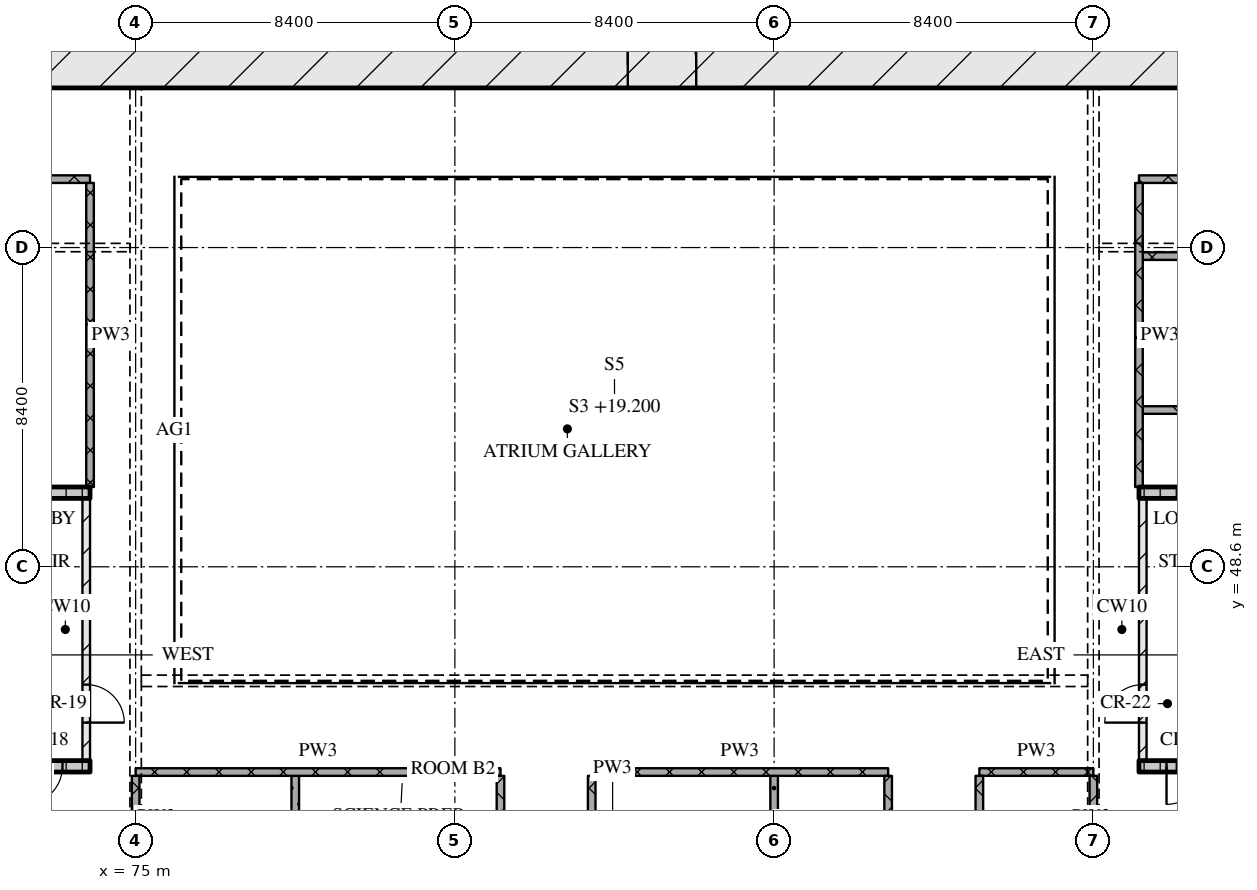
"""IFC4 building model, lengths in metres.
Left out: names, types, materials, properties, quantities, classifications, styles, units other than length and angle.
Written with IfcOpenShell. Run it as: python <this file> out.ifc"""

import sys

from ifc_helpers import new_model, si_unit, direction, frame, frame_2d, origin, place, context, subcontext, project, spatial, rectangle, extrude, element, fill, save


model = new_model("IFC4")
c1 = context("Model", 3, precision=1e-05, world=origin(), true_north=direction((0.0, 1.0)))
c2 = subcontext(c1, "Body", "Model", "MODEL_VIEW")
j1 = project(units=[si_unit("LENGTHUNIT", "METRE"), si_unit("PLANEANGLEUNIT", "RADIAN")], contexts=[c1])
p1 = place(None, origin())
s1 = spatial("IfcSite", under=j1, at=p1, CompositionType="ELEMENT")
p2 = place(p1, origin())
s2 = spatial("IfcBuilding", under=s1, at=p2, CompositionType="ELEMENT")
p3 = place(p2, frame((0.0, 0.0, 19.2)))
s3 = spatial("IfcBuildingStorey", under=s2, at=p3, CompositionType="ELEMENT", Elevation=19.2)
p4 = place(p3, frame((66.6, 61.8, 0.0), z_axis=(0.0, 0.0, 1.0), x_axis=(1.0, 0.0, 0.0)))
e1 = element("IfcWall", 1, at=p4, inside=s3, PredefinedType="SOLIDWALL", context=c2, shape_type="SweptSolid", body=[
    extrude(rectangle(XDim=42.0, YDim=1.2, at=frame_2d((21.0, 0.0))), origin(), (0.0, 0.0, 1.0), 4.2),
])
p5 = place(p4, frame((21.35, 0.0, 0.0)))
e2 = element("IfcOpeningElement", 2, at=p5, cuts=e1, PredefinedType="OPENING", context=c2, shape_type="SweptSolid", body=[
    extrude(rectangle(XDim=1.8, YDim=2.1, at=frame_2d((0.9, 1.05))), frame((0.0, 0.61, 0.0), z_axis=(0.0, -1.0, 0.0), x_axis=(1.0, 0.0, 0.0)), (0.0, 0.0, 1.0), 1.22),
])
p6 = place(p3, frame((68.2, 43.35, 0.0), z_axis=(0.0, 0.0, 1.0), x_axis=(1.0, 0.0, 0.0)))
e3 = element("IfcWall", 3, at=p6, inside=s3, PredefinedType="SOLIDWALL", context=c2, shape_type="SweptSolid", body=[
    extrude(rectangle(XDim=5.6, YDim=0.3, at=frame_2d((2.8, 0.0))), origin(), (0.0, 0.0, 1.0), 4.2),
])
p7 = place(p6, frame((3.875, 0.0, 0.0)))
e4 = element("IfcOpeningElement", 4, at=p7, cuts=e3, PredefinedType="OPENING", context=c2, shape_type="SweptSolid", body=[
    extrude(rectangle(XDim=1.0, YDim=2.1, at=frame_2d((0.5, 1.05))), frame((0.0, 0.16, 0.0), z_axis=(0.0, -1.0, 0.0), x_axis=(1.0, 0.0, 0.0)), (0.0, 0.0, 1.0), 0.32),
])
p8 = place(p3, frame((73.7, 43.5, 0.0), z_axis=(0.0, 0.0, 1.0), x_axis=(0.0, 1.0, 0.0)))
e5 = element("IfcWall", 5, at=p8, inside=s3, PredefinedType="PARTITIONING", context=c2, shape_type="SweptSolid", body=[
    extrude(rectangle(XDim=6.9, YDim=0.2, at=frame_2d((3.45, 0.0))), origin(), (0.0, 0.0, 1.0), 4.2),
])
p9 = place(p8, frame((1.0, 0.0, 0.0)))
e6 = element("IfcOpeningElement", 6, at=p9, cuts=e5, PredefinedType="OPENING", context=c2, shape_type="SweptSolid", body=[
    extrude(rectangle(XDim=1.0, YDim=2.1, at=frame_2d((0.5, 1.05))), frame((0.0, 0.11, 0.0), z_axis=(0.0, -1.0, 0.0), x_axis=(1.0, 0.0, 0.0)), (0.0, 0.0, 1.0), 0.22),
])
p10 = place(p3, frame((68.2, 50.55, 0.0), z_axis=(0.0, 0.0, 1.0), x_axis=(1.0, 0.0, 0.0)))
e7 = element("IfcWall", 7, at=p10, inside=s3, PredefinedType="SOLIDWALL", context=c2, shape_type="SweptSolid", body=[
    extrude(rectangle(XDim=5.6, YDim=0.3, at=frame_2d((2.8, 0.0))), origin(), (0.0, 0.0, 1.0), 4.2),
])
p11 = place(p3, frame((101.4, 43.35, 0.0), z_axis=(0.0, 0.0, 1.0), x_axis=(1.0, 0.0, 0.0)))
e8 = element("IfcWall", 8, at=p11, inside=s3, PredefinedType="SOLIDWALL", context=c2, shape_type="SweptSolid", body=[
    extrude(rectangle(XDim=5.6, YDim=0.3, at=frame_2d((2.8, 0.0))), origin(), (0.0, 0.0, 1.0), 4.2),
])
p12 = place(p11, frame((0.725, 0.0, 0.0)))
e9 = element("IfcOpeningElement", 9, at=p12, cuts=e8, PredefinedType="OPENING", context=c2, shape_type="SweptSolid", body=[
    extrude(rectangle(XDim=1.0, YDim=2.1, at=frame_2d((0.5, 1.05))), frame((0.0, 0.16, 0.0), z_axis=(0.0, -1.0, 0.0), x_axis=(1.0, 0.0, 0.0)), (0.0, 0.0, 1.0), 0.32),
])
p13 = place(p3, frame((101.5, 43.5, 0.0), z_axis=(0.0, 0.0, 1.0), x_axis=(0.0, 1.0, 0.0)))
e10 = element("IfcWall", 10, at=p13, inside=s3, PredefinedType="PARTITIONING", context=c2, shape_type="SweptSolid", body=[
    extrude(rectangle(XDim=6.9, YDim=0.2, at=frame_2d((3.45, 0.0))), origin(), (0.0, 0.0, 1.0), 4.2),
])
p14 = place(p13, frame((1.0, 0.0, 0.0)))
e11 = element("IfcOpeningElement", 11, at=p14, cuts=e10, PredefinedType="OPENING", context=c2, shape_type="SweptSolid", body=[
    extrude(rectangle(XDim=1.0, YDim=2.1, at=frame_2d((0.5, 1.05))), frame((0.0, 0.11, 0.0), z_axis=(0.0, -1.0, 0.0), x_axis=(1.0, 0.0, 0.0)), (0.0, 0.0, 1.0), 0.22),
])
p15 = place(p3, frame((101.4, 50.55, 0.0), z_axis=(0.0, 0.0, 1.0), x_axis=(1.0, 0.0, 0.0)))
e12 = element("IfcWall", 12, at=p15, inside=s3, PredefinedType="SOLIDWALL", context=c2, shape_type="SweptSolid", body=[
    extrude(rectangle(XDim=5.6, YDim=0.3, at=frame_2d((2.8, 0.0))), origin(), (0.0, 0.0, 1.0), 4.2),
])
p16 = place(p3, frame((75.0, 43.2, 0.0), z_axis=(0.0, 0.0, 1.0), x_axis=(1.0, 0.0, 0.0)))
e13 = element("IfcWall", 13, at=p16, inside=s3, PredefinedType="PARTITIONING", context=c2, shape_type="SweptSolid", body=[
    extrude(rectangle(XDim=9.6, YDim=0.2, at=frame_2d((4.8, 0.0))), origin(), (0.0, 0.0, 1.0), 4.2),
])
p17 = place(p3, frame((87.0, 43.2, 0.0), z_axis=(0.0, 0.0, 1.0), x_axis=(1.0, 0.0, 0.0)))
e14 = element("IfcWall", 14, at=p17, inside=s3, PredefinedType="PARTITIONING", context=c2, shape_type="SweptSolid", body=[
    extrude(rectangle(XDim=7.8, YDim=0.2, at=frame_2d((3.9, 0.0))), origin(), (0.0, 0.0, 1.0), 4.2),
])
p18 = place(p3, frame((97.2, 43.2, 0.0), z_axis=(0.0, 0.0, 1.0), x_axis=(1.0, 0.0, 0.0)))
e15 = element("IfcWall", 15, at=p18, inside=s3, PredefinedType="PARTITIONING", context=c2, shape_type="SweptSolid", body=[
    extrude(rectangle(XDim=3.0, YDim=0.2, at=frame_2d((1.5, 0.0))), origin(), (0.0, 0.0, 1.0), 4.2),
])
for number, where, z_axis, x_axis in (
    (16, (101.5, 52.725, 0.0), (0.0, 0.0, 1.0), (1.0, 0.0, 0.0)),
    (17, (101.5, 54.75, 0.0), (0.0, 0.0, 1.0), (1.0, 0.0, 0.0)),
):
    element("IfcWall", number, at=place(p3, frame(where, z_axis=z_axis, x_axis=x_axis)), inside=s3, PredefinedType="PARTITIONING", context=c2, shape_type="SweptSolid", body=[
        extrude(rectangle(XDim=10.6, YDim=0.2, at=frame_2d((5.3, 0.0))), origin(), (0.0, 0.0, 1.0), 4.2),
    ])
p19 = place(p3, frame((101.5, 56.775, 0.0), z_axis=(0.0, 0.0, 1.0), x_axis=(1.0, 0.0, 0.0)))
e18 = element("IfcWall", 18, at=p19, inside=s3, PredefinedType="PARTITIONING", context=c2, shape_type="SweptSolid", body=[
    extrude(rectangle(XDim=6.63, YDim=0.2, at=frame_2d((3.315, 0.0))), origin(), (0.0, 0.0, 1.0), 4.2),
])
p20 = place(p3, frame((73.8, 58.8, 0.0), z_axis=(0.0, 0.0, 1.0), x_axis=(-1.0, 0.0, 0.0)))
e19 = element("IfcWall", 19, at=p20, inside=s3, PredefinedType="PARTITIONING", context=c2, shape_type="SweptSolid", body=[
    extrude(rectangle(XDim=10.8, YDim=0.2, at=frame_2d((5.4, 0.0))), origin(), (0.0, 0.0, 1.0), 4.2),
])
p21 = place(p20, frame((4.95, 0.0, 0.0)))
e20 = element("IfcOpeningElement", 20, at=p21, cuts=e19, PredefinedType="OPENING", context=c2, shape_type="SweptSolid", body=[
    extrude(rectangle(XDim=0.9, YDim=2.1, at=frame_2d((0.45, 1.05))), frame((0.0, 0.11, 0.0), z_axis=(0.0, -1.0, 0.0), x_axis=(1.0, 0.0, 0.0)), (0.0, 0.0, 1.0), 0.22),
])
p22 = place(p3, frame((101.4, 58.8, 0.0), z_axis=(0.0, 0.0, 1.0), x_axis=(1.0, 0.0, 0.0)))
e21 = element("IfcWall", 21, at=p22, inside=s3, PredefinedType="PARTITIONING", context=c2, shape_type="SweptSolid", body=[
    extrude(rectangle(XDim=10.8, YDim=0.2, at=frame_2d((5.4, 0.0))), origin(), (0.0, 0.0, 1.0), 4.2),
])
p23 = place(p3, frame((73.8, 58.7, 0.0), z_axis=(0.0, 0.0, 1.0), x_axis=(0.0, -1.0, 0.0)))
e22 = element("IfcWall", 22, at=p23, inside=s3, PredefinedType="PARTITIONING", context=c2, shape_type="SweptSolid", body=[
    extrude(rectangle(XDim=8.0, YDim=0.2, at=frame_2d((4.0, 0.0))), origin(), (0.0, 0.0, 1.0), 4.2),
])
p24 = place(p3, frame((75.0, 43.1, 0.0), z_axis=(0.0, 0.0, 1.0), x_axis=(0.0, -1.0, 0.0)))
e23 = element("IfcWall", 23, at=p24, inside=s3, PredefinedType="PARTITIONING", context=c2, shape_type="SweptSolid", body=[
    extrude(rectangle(XDim=2.2, YDim=0.2, at=frame_2d((1.1, 0.0))), origin(), (0.0, 0.0, 1.0), 3.3),
])
for number, where, z_axis, x_axis in (
    (24, (79.2, 43.1, 0.0), (0.0, 0.0, 1.0), (0.0, -1.0, 0.0)),
    (25, (84.6, 43.1, 0.0), (0.0, 0.0, 1.0), (0.0, -1.0, 0.0)),
):
    element("IfcWall", number, at=place(p3, frame(where, z_axis=z_axis, x_axis=x_axis)), inside=s3, PredefinedType="PARTITIONING", context=c2, shape_type="SweptSolid", body=[
        extrude(rectangle(XDim=4.0, YDim=0.2, at=frame_2d((2.0, 0.0))), origin(), (0.0, 0.0, 1.0), 4.2),
    ])
p25 = place(p3, frame((87.0, 43.1, 0.0), z_axis=(0.0, 0.0, 1.0), x_axis=(0.0, -1.0, 0.0)))
e26 = element("IfcWall", 26, at=p25, inside=s3, PredefinedType="PARTITIONING", context=c2, shape_type="SweptSolid", body=[
    extrude(rectangle(XDim=4.0, YDim=0.2, at=frame_2d((2.0, 0.0))), origin(), (0.0, 0.0, 1.0), 4.2),
])
p26 = place(p25, frame((1.55, 0.0, 0.0)))
e27 = element("IfcOpeningElement", 27, at=p26, cuts=e26, PredefinedType="OPENING", context=c2, shape_type="SweptSolid", body=[
    extrude(rectangle(XDim=0.9, YDim=2.1, at=frame_2d((0.45, 1.05))), frame((0.0, 0.11, 0.0), z_axis=(0.0, -1.0, 0.0), x_axis=(1.0, 0.0, 0.0)), (0.0, 0.0, 1.0), 0.22),
])
p27 = place(p3, frame((91.8, 43.1, 0.0), z_axis=(0.0, 0.0, 1.0), x_axis=(0.0, -1.0, 0.0)))
e28 = element("IfcWall", 28, at=p27, inside=s3, PredefinedType="PARTITIONING", context=c2, shape_type="SweptSolid", body=[
    extrude(rectangle(XDim=2.43, YDim=0.2, at=frame_2d((1.215, 0.0))), origin(), (0.0, 0.0, 1.0), 4.2),
])
p28 = place(p3, frame((94.8, 43.1, 0.0), z_axis=(0.0, 0.0, 1.0), x_axis=(0.0, -1.0, 0.0)))
e29 = element("IfcWall", 29, at=p28, inside=s3, PredefinedType="PARTITIONING", context=c2, shape_type="SweptSolid", body=[
    extrude(rectangle(XDim=4.0, YDim=0.2, at=frame_2d((2.0, 0.0))), origin(), (0.0, 0.0, 1.0), 4.2),
])
p29 = place(p3, frame((97.2, 43.1, 0.0), z_axis=(0.0, 0.0, 1.0), x_axis=(0.0, -1.0, 0.0)))
e30 = element("IfcWall", 30, at=p29, inside=s3, PredefinedType="PARTITIONING", context=c2, shape_type="SweptSolid", body=[
    extrude(rectangle(XDim=4.0, YDim=0.2, at=frame_2d((2.0, 0.0))), origin(), (0.0, 0.0, 1.0), 4.2),
])
p30 = place(p29, frame((1.55, 0.0, 0.0)))
e31 = element("IfcOpeningElement", 31, at=p30, cuts=e30, PredefinedType="OPENING", context=c2, shape_type="SweptSolid", body=[
    extrude(rectangle(XDim=0.9, YDim=2.1, at=frame_2d((0.45, 1.05))), frame((0.0, 0.11, 0.0), z_axis=(0.0, -1.0, 0.0), x_axis=(1.0, 0.0, 0.0)), (0.0, 0.0, 1.0), 0.22),
])
p31 = place(p3, frame((100.2, 43.1, 0.0), z_axis=(0.0, 0.0, 1.0), x_axis=(0.0, -1.0, 0.0)))
e32 = element("IfcWall", 32, at=p31, inside=s3, PredefinedType="PARTITIONING", context=c2, shape_type="SweptSolid", body=[
    extrude(rectangle(XDim=2.2, YDim=0.2, at=frame_2d((1.1, 0.0))), origin(), (0.0, 0.0, 1.0), 3.3),
])
p32 = place(p3, frame((101.4, 58.7, 0.0), z_axis=(0.0, 0.0, 1.0), x_axis=(0.0, -1.0, 0.0)))
e33 = element("IfcWall", 33, at=p32, inside=s3, PredefinedType="PARTITIONING", context=c2, shape_type="SweptSolid", body=[
    extrude(rectangle(XDim=8.0, YDim=0.2, at=frame_2d((4.0, 0.0))), origin(), (0.0, 0.0, 1.0), 4.2),
])
p33 = place(p5, origin())
e34 = element("IfcDoor", 34, at=p33, inside=s3, OperationType="DOUBLE_DOOR_SINGLE_SWING", PredefinedType="DOOR", context=c2, shape_type="SweptSolid", body=[
    extrude(rectangle(XDim=1.8, YDim=2.1, at=frame_2d((0.9, 1.05))), frame((0.0, 0.025, 0.0), z_axis=(0.0, -1.0, 0.0), x_axis=(1.0, 0.0, 0.0)), (0.0, 0.0, 1.0), 0.05),
])
fill(e2, e34)
p34 = place(p7, origin())
e35 = element("IfcDoor", 35, at=p34, inside=s3, OperationType="SINGLE_SWING_RIGHT", PredefinedType="DOOR", context=c2, shape_type="SweptSolid", body=[
    extrude(rectangle(XDim=1.0, YDim=2.1, at=frame_2d((0.5, 1.05))), frame((0.0, 0.025, 0.0), z_axis=(0.0, -1.0, 0.0), x_axis=(1.0, 0.0, 0.0)), (0.0, 0.0, 1.0), 0.05),
])
fill(e4, e35)
p35 = place(p9, origin())
e36 = element("IfcDoor", 36, at=p35, inside=s3, OperationType="SINGLE_SWING_RIGHT", PredefinedType="DOOR", context=c2, shape_type="SweptSolid", body=[
    extrude(rectangle(XDim=1.0, YDim=2.1, at=frame_2d((0.5, 1.05))), frame((0.0, 0.025, 0.0), z_axis=(0.0, -1.0, 0.0), x_axis=(1.0, 0.0, 0.0)), (0.0, 0.0, 1.0), 0.05),
])
fill(e6, e36)
p36 = place(p12, origin())
e37 = element("IfcDoor", 37, at=p36, inside=s3, OperationType="SINGLE_SWING_RIGHT", PredefinedType="DOOR", context=c2, shape_type="SweptSolid", body=[
    extrude(rectangle(XDim=1.0, YDim=2.1, at=frame_2d((0.5, 1.05))), frame((0.0, 0.025, 0.0), z_axis=(0.0, -1.0, 0.0), x_axis=(1.0, 0.0, 0.0)), (0.0, 0.0, 1.0), 0.05),
])
fill(e9, e37)
p37 = place(p14, origin())
e38 = element("IfcDoor", 38, at=p37, inside=s3, OperationType="SINGLE_SWING_LEFT", PredefinedType="DOOR", context=c2, shape_type="SweptSolid", body=[
    extrude(rectangle(XDim=1.0, YDim=2.1, at=frame_2d((0.5, 1.05))), frame((0.0, 0.025, 0.0), z_axis=(0.0, -1.0, 0.0), x_axis=(1.0, 0.0, 0.0)), (0.0, 0.0, 1.0), 0.05),
])
fill(e11, e38)
save(model, sys.argv[1])
